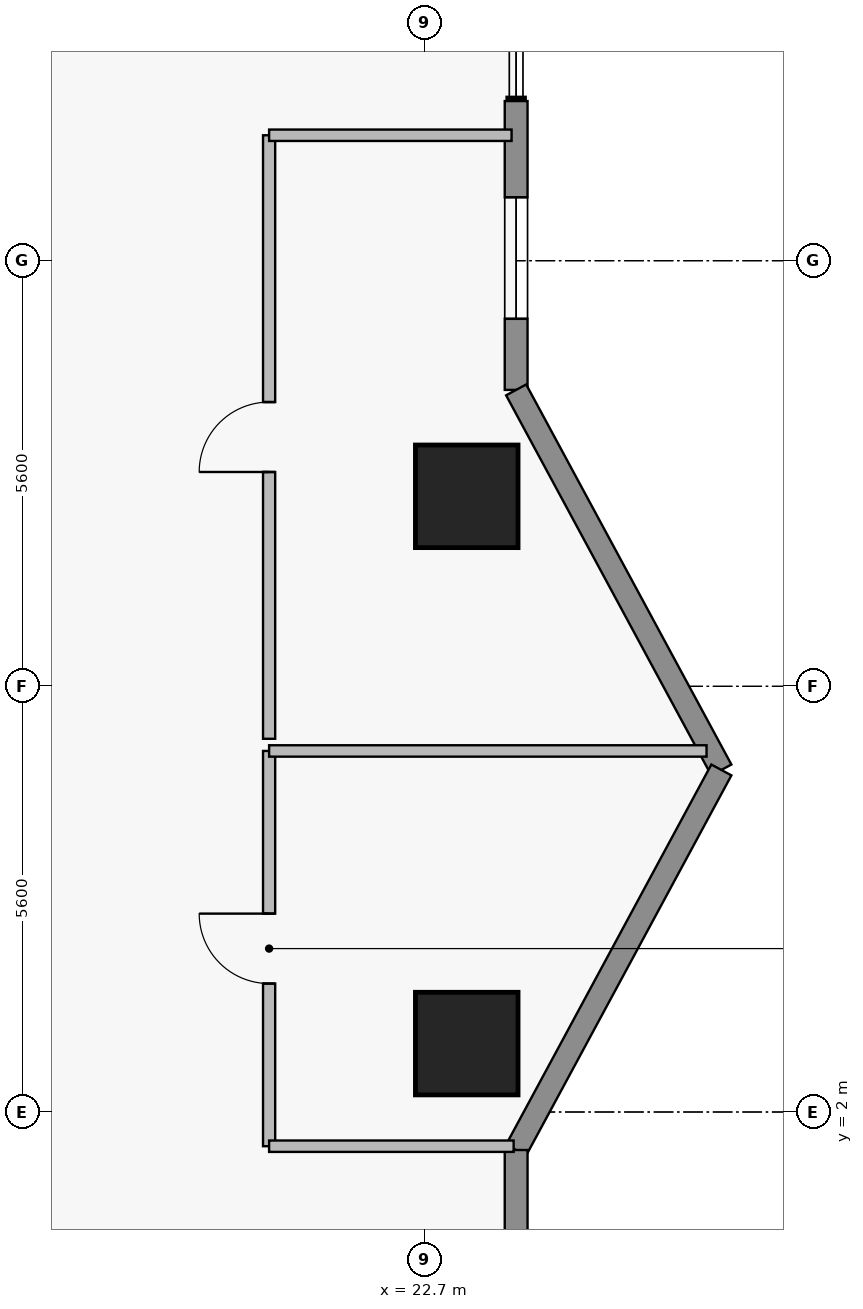
"""IFC4 building model, lengths in metres.
Left out: names, types, materials, properties, quantities, classifications, styles, units other than length and angle.
Written with IfcOpenShell. Run it as: python <this file> out.ifc"""

import sys

from ifc_helpers import new_model, si_unit, direction, frame, frame_2d, origin, origin_2d, place, context, subcontext, project, spatial, rectangle, extrude, element, fill, save


model = new_model("IFC4")
c1 = context("Model", 3, precision=1e-05, world=origin(), true_north=direction((0.0, 1.0)))
c2 = subcontext(c1, "Body", "Model", "MODEL_VIEW")
j1 = project(units=[si_unit("LENGTHUNIT", "METRE"), si_unit("PLANEANGLEUNIT", "RADIAN")], contexts=[c1])
p1 = place(None, origin())
s1 = spatial("IfcSite", under=j1, at=p1, CompositionType="ELEMENT")
p2 = place(p1, origin())
s2 = spatial("IfcBuilding", under=s1, at=p2, CompositionType="ELEMENT")
p3 = place(p2, frame((0.0, 0.0, 139.45)))
s3 = spatial("IfcBuildingStorey", under=s2, at=p3, CompositionType="ELEMENT", Elevation=139.45)
for number, where, z_axis, x_axis in (
    (1, (23.25, 2.9, 0.0), (0.0, 0.0, 1.0), (1.0, 0.0, 0.0)),
    (2, (23.25, 10.1, 0.0), (0.0, 0.0, 1.0), (1.0, 0.0, 0.0)),
):
    element("IfcColumn", number, at=place(p3, frame(where, z_axis=z_axis, x_axis=x_axis)), inside=s3, PredefinedType="COLUMN", context=c2, shape_type="SweptSolid", body=[
        extrude(rectangle(XDim=1.35, YDim=1.35, at=origin_2d()), origin(), (0.0, 0.0, 1.0), 3.65),
    ])
p4 = place(p3, frame((23.9, 15.3, 0.0), z_axis=(0.0, 0.0, 1.0), x_axis=(0.0, -1.0, 0.0)))
e3 = element("IfcWall", 3, at=p4, inside=s3, PredefinedType="STANDARD", context=c2, shape_type="SweptSolid", body=[
    extrude(rectangle(XDim=3.8, YDim=0.3, at=frame_2d((1.9, 0.0))), origin(), (0.0, 0.0, 1.0), 3.43),
])
p5 = place(p4, frame((1.265, 0.0, 0.85)))
e4 = element("IfcOpeningElement", 4, at=p5, cuts=e3, PredefinedType="OPENING", context=c2, shape_type="SweptSolid", body=[
    extrude(rectangle(XDim=1.6, YDim=1.8, at=frame_2d((0.8, 0.9))), frame((0.0, 0.16, 0.0), z_axis=(0.0, -1.0, 0.0), x_axis=(1.0, 0.0, 0.0)), (0.0, 0.0, 1.0), 0.32),
])
for number, where, z_axis, x_axis in (
    (5, (23.9, 11.5, 0.0), (0.0, 0.0, 1.0), (0.475, -0.88, 0.0)),
    (6, (26.6, 6.5, 0.0), (0.0, 0.0, 1.0), (-0.475, -0.88, 0.0)),
):
    element("IfcWall", number, at=place(p3, frame(where, z_axis=z_axis, x_axis=x_axis)), inside=s3, PredefinedType="STANDARD", context=c2, shape_type="SweptSolid", body=[
        extrude(rectangle(XDim=5.683, YDim=0.3, at=frame_2d((2.841, 0.0))), origin(), (0.0, 0.0, 1.0), 3.43),
    ])
p6 = place(p3, frame((23.9, 1.5, 0.0), z_axis=(0.0, 0.0, 1.0), x_axis=(0.0, -1.0, 0.0)))
e7 = element("IfcWall", 7, at=p6, inside=s3, PredefinedType="STANDARD", context=c2, shape_type="SweptSolid", body=[
    extrude(rectangle(XDim=1.15, YDim=0.3, at=frame_2d((0.575, 0.0))), origin(), (0.0, 0.0, 1.0), 3.43),
])
p7 = place(p3, frame((20.65, 1.55, 0.0), z_axis=(0.0, 0.0, 1.0), x_axis=(0.0, 1.0, 0.0)))
e8 = element("IfcWall", 8, at=p7, inside=s3, PredefinedType="PARTITIONING", context=c2, shape_type="SweptSolid", body=[
    extrude(rectangle(XDim=5.2, YDim=0.16, at=frame_2d((2.6, 0.0))), origin(), (0.0, 0.0, 1.0), 3.43),
])
p8 = place(p7, frame((2.14, 0.0, 0.0)))
e9 = element("IfcOpeningElement", 9, at=p8, cuts=e8, PredefinedType="OPENING", context=c2, shape_type="SweptSolid", body=[
    extrude(rectangle(XDim=0.92, YDim=2.12, at=frame_2d((0.46, 1.06))), frame((0.0, 0.09, 0.0), z_axis=(0.0, -1.0, 0.0), x_axis=(1.0, 0.0, 0.0)), (0.0, 0.0, 1.0), 0.18),
])
p9 = place(p3, frame((20.65, 6.91, 0.0), z_axis=(0.0, 0.0, 1.0), x_axis=(0.0, 1.0, 0.0)))
e10 = element("IfcWall", 10, at=p9, inside=s3, PredefinedType="PARTITIONING", context=c2, shape_type="SweptSolid", body=[
    extrude(rectangle(XDim=7.94, YDim=0.16, at=frame_2d((3.97, 0.0))), origin(), (0.0, 0.0, 1.0), 3.43),
])
p10 = place(p9, frame((3.51, 0.0, 0.0)))
e11 = element("IfcOpeningElement", 11, at=p10, cuts=e10, PredefinedType="OPENING", context=c2, shape_type="SweptSolid", body=[
    extrude(rectangle(XDim=0.92, YDim=2.12, at=frame_2d((0.46, 1.06))), frame((0.0, 0.09, 0.0), z_axis=(0.0, -1.0, 0.0), x_axis=(1.0, 0.0, 0.0)), (0.0, 0.0, 1.0), 0.18),
])
p11 = place(p3, frame((20.65, 1.55, 0.0), z_axis=(0.0, 0.0, 1.0), x_axis=(1.0, 0.0, 0.0)))
e12 = element("IfcWall", 12, at=p11, inside=s3, PredefinedType="PARTITIONING", context=c2, shape_type="SweptSolid", body=[
    extrude(rectangle(XDim=3.217, YDim=0.15, at=frame_2d((1.608, 0.0))), origin(), (0.0, 0.0, 1.0), 3.43),
])
p12 = place(p3, frame((20.65, 6.75, 0.0), z_axis=(0.0, 0.0, 1.0), x_axis=(1.0, 0.0, 0.0)))
e13 = element("IfcWall", 13, at=p12, inside=s3, PredefinedType="PARTITIONING", context=c2, shape_type="SweptSolid", body=[
    extrude(rectangle(XDim=5.755, YDim=0.15, at=frame_2d((2.877, 0.0))), origin(), (0.0, 0.0, 1.0), 3.43),
])
p13 = place(p3, frame((20.65, 14.85, 0.0), z_axis=(0.0, 0.0, 1.0), x_axis=(1.0, 0.0, 0.0)))
e14 = element("IfcWall", 14, at=p13, inside=s3, PredefinedType="PARTITIONING", context=c2, shape_type="SweptSolid", body=[
    extrude(rectangle(XDim=3.19, YDim=0.15, at=frame_2d((1.595, 0.0))), origin(), (0.0, 0.0, 1.0), 3.43),
])
p14 = place(p5, origin())
e15 = element("IfcWindow", 15, at=p14, inside=s3, PartitioningType="SINGLE_PANEL", PredefinedType="WINDOW", context=c2, shape_type="SweptSolid", body=[
    extrude(rectangle(XDim=1.6, YDim=1.8, at=frame_2d((0.8, 0.9))), frame((0.0, 0.03, 0.0), z_axis=(0.0, -1.0, 0.0), x_axis=(1.0, 0.0, 0.0)), (0.0, 0.0, 1.0), 0.06),
])
fill(e4, e15)
p15 = place(p8, origin())
e16 = element("IfcDoor", 16, at=p15, inside=s3, OperationType="SINGLE_SWING_RIGHT", PredefinedType="DOOR", context=c2, shape_type="SweptSolid", body=[
    extrude(rectangle(XDim=0.92, YDim=2.12, at=frame_2d((0.46, 1.06))), frame((0.0, 0.025, 0.0), z_axis=(0.0, -1.0, 0.0), x_axis=(1.0, 0.0, 0.0)), (0.0, 0.0, 1.0), 0.05),
])
fill(e9, e16)
p16 = place(p10, origin())
e17 = element("IfcDoor", 17, at=p16, inside=s3, OperationType="SINGLE_SWING_LEFT", PredefinedType="DOOR", context=c2, shape_type="SweptSolid", body=[
    extrude(rectangle(XDim=0.92, YDim=2.12, at=frame_2d((0.46, 1.06))), frame((0.0, 0.025, 0.0), z_axis=(0.0, -1.0, 0.0), x_axis=(1.0, 0.0, 0.0)), (0.0, 0.0, 1.0), 0.05),
])
fill(e11, e17)
save(model, sys.argv[1])
